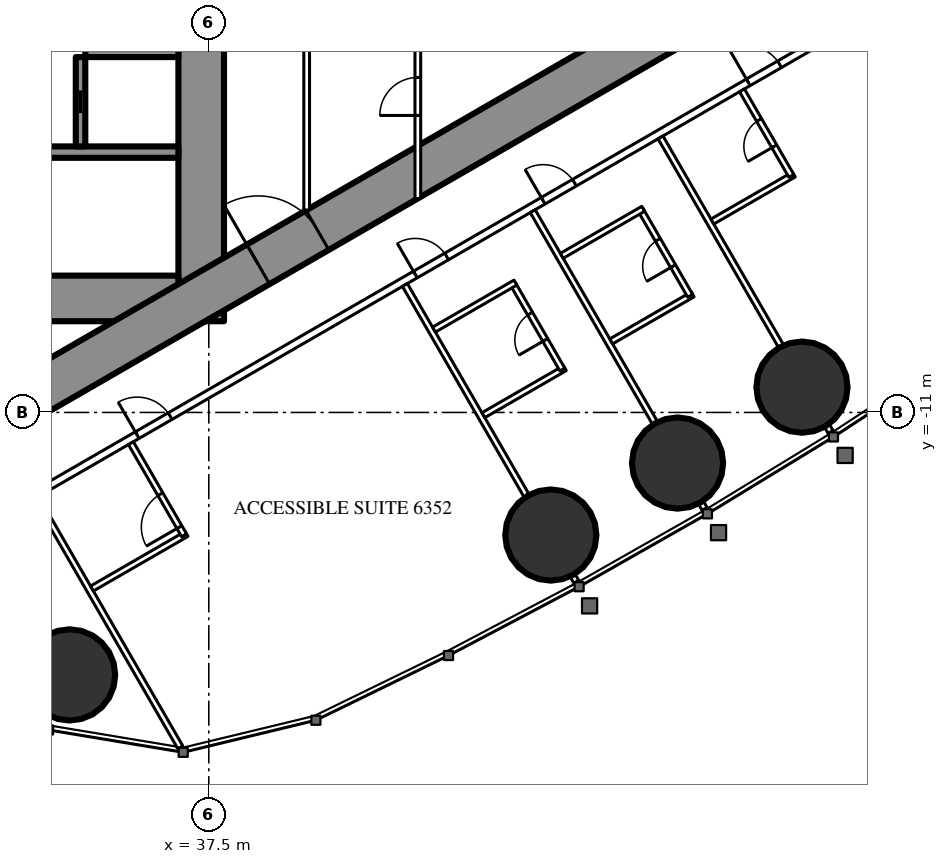
"""IFC4 building model, lengths in metres.
Left out: names, types, materials, properties, quantities, classifications, styles, units other than length and angle.
Written with IfcOpenShell. Run it as: python <this file> out.ifc"""

import sys

from ifc_helpers import new_model, si_unit, direction, frame, frame_2d, origin, origin_2d, place, context, subcontext, project, spatial, rectangle, circle, extrude, element, fill, save


model = new_model("IFC4")
c1 = context("Model", 3, precision=1e-05, world=origin(), true_north=direction((0.0, 1.0)))
c2 = subcontext(c1, "Body", "Model", "MODEL_VIEW")
j1 = project(units=[si_unit("LENGTHUNIT", "METRE"), si_unit("PLANEANGLEUNIT", "RADIAN")], contexts=[c1])
p1 = place(None, origin())
s1 = spatial("IfcSite", under=j1, at=p1, CompositionType="ELEMENT")
p2 = place(p1, origin())
s2 = spatial("IfcBuilding", under=s1, at=p2, CompositionType="ELEMENT")
p3 = place(p2, frame((0.0, 0.0, 236.9)))
s3 = spatial("IfcBuildingStorey", under=s2, at=p3, CompositionType="ELEMENT", Elevation=236.9)
for number, where, z_axis, x_axis in (
    (1, (33.837, -17.906, 0.0), (0.0, 0.0, 1.0), (1.0, 0.0, 0.0)),
    (2, (46.499, -14.226, 0.0), (0.0, 0.0, 1.0), (1.0, 0.0, 0.0)),
    (3, (49.834, -12.332, 0.0), (0.0, 0.0, 1.0), (1.0, 0.0, 0.0)),
    (4, (53.108, -10.334, 0.0), (0.0, 0.0, 1.0), (1.0, 0.0, 0.0)),
):
    element("IfcColumn", number, at=place(p3, frame(where, z_axis=z_axis, x_axis=x_axis)), inside=s3, PredefinedType="COLUMN", context=c2, shape_type="SweptSolid", body=[
        extrude(circle(Radius=1.2, at=origin_2d()), origin(), (0.0, 0.0, 1.0), 3.6),
    ])
p4 = place(p3, frame((37.3, -8.6, 0.0), z_axis=(0.0, 0.0, 1.0), x_axis=(0.0, 1.0, 0.0)))
e5 = element("IfcWall", 5, at=p4, inside=s3, PredefinedType="SHEAR", context=c2, shape_type="SweptSolid", body=[
    extrude(rectangle(XDim=17.2, YDim=1.2, at=frame_2d((8.6, 0.0))), origin(), (0.0, 0.0, 1.0), 3.6),
])
p5 = place(p4, frame((7.7, 0.0, 0.0)))
e6 = element("IfcOpeningElement", 6, at=p5, cuts=e5, PredefinedType="OPENING", context=c2, shape_type="SweptSolid", body=[
    extrude(rectangle(XDim=1.8, YDim=2.2, at=frame_2d((0.9, 1.1))), frame((0.0, 0.61, 0.0), z_axis=(0.0, -1.0, 0.0), x_axis=(1.0, 0.0, 0.0)), (0.0, 0.0, 1.0), 1.22),
])
p6 = place(p3, frame((28.3, -8.0, 0.0), z_axis=(0.0, 0.0, 1.0), x_axis=(1.0, 0.0, 0.0)))
e7 = element("IfcWall", 7, at=p6, inside=s3, PredefinedType="SHEAR", context=c2, shape_type="SweptSolid", body=[
    extrude(rectangle(XDim=8.4, YDim=1.2, at=frame_2d((4.2, 0.0))), origin(), (0.0, 0.0, 1.0), 3.6),
])
p7 = place(p6, frame((0.25, 0.0, 0.0)))
e8 = element("IfcOpeningElement", 8, at=p7, cuts=e7, PredefinedType="OPENING", context=c2, shape_type="SweptSolid", body=[
    extrude(rectangle(XDim=1.0, YDim=2.2, at=frame_2d((0.5, 1.1))), frame((0.0, 0.61, 0.0), z_axis=(0.0, -1.0, 0.0), x_axis=(1.0, 0.0, 0.0)), (0.0, 0.0, 1.0), 1.22),
])
p8 = place(p3, frame((28.3, -4.15, 0.0), z_axis=(0.0, 0.0, 1.0), x_axis=(1.0, 0.0, 0.0)))
e9 = element("IfcWall", 9, at=p8, inside=s3, PredefinedType="SHEAR", context=c2, shape_type="SweptSolid", body=[
    extrude(rectangle(XDim=8.4, YDim=0.3, at=frame_2d((4.2, 0.0))), origin(), (0.0, 0.0, 1.0), 3.6),
])
p9 = place(p3, frame((34.125, -4.0, 0.0), z_axis=(0.0, 0.0, 1.0), x_axis=(0.0, 1.0, 0.0)))
e10 = element("IfcWall", 10, at=p9, inside=s3, PredefinedType="SHEAR", context=c2, shape_type="SweptSolid", body=[
    extrude(rectangle(XDim=2.35, YDim=0.25, at=frame_2d((1.175, 0.0))), origin(), (0.0, 0.0, 1.0), 3.6),
])
p10 = place(p9, frame((0.875, 0.0, 0.0)))
e11 = element("IfcOpeningElement", 11, at=p10, cuts=e10, PredefinedType="OPENING", context=c2, shape_type="SweptSolid", body=[
    extrude(rectangle(XDim=0.6, YDim=2.0, at=frame_2d((0.3, 1.0))), frame((0.0, 0.135, 0.0), z_axis=(0.0, -1.0, 0.0), x_axis=(1.0, 0.0, 0.0)), (0.0, 0.0, 1.0), 0.27),
])
p11 = place(p3, frame((34.25, -1.525, 0.0), z_axis=(0.0, 0.0, 1.0), x_axis=(1.0, 0.0, 0.0)))
e12 = element("IfcWall", 12, at=p11, inside=s3, PredefinedType="SHEAR", context=c2, shape_type="SweptSolid", body=[
    extrude(rectangle(XDim=2.45, YDim=0.25, at=frame_2d((1.225, 0.0))), origin(), (0.0, 0.0, 1.0), 3.6),
])
p12 = place(p3, frame((27.2, -13.8, 0.0), z_axis=(0.0, 0.0, 1.0), x_axis=(0.866027159892, 0.499996958321, 0.0)))
e13 = element("IfcWall", 13, at=p12, inside=s3, PredefinedType="SHEAR", context=c2, shape_type="SweptSolid", body=[
    extrude(rectangle(XDim=27.947, YDim=1.2, at=frame_2d((13.973, 0.0))), origin(), (0.0, 0.0, 1.0), 3.6),
])
p13 = place(p12, frame((4.6, 0.0, 0.0)))
e14 = element("IfcOpeningElement", 14, at=p13, cuts=e13, PredefinedType="OPENING", context=c2, shape_type="SweptSolid", body=[
    extrude(rectangle(XDim=1.0, YDim=2.2, at=frame_2d((0.5, 1.1))), frame((0.0, 0.61, 0.0), z_axis=(0.0, -1.0, 0.0), x_axis=(1.0, 0.0, 0.0)), (0.0, 0.0, 1.0), 1.22),
])
p14 = place(p12, frame((13.395, 0.0, 0.0)))
e15 = element("IfcOpeningElement", 15, at=p14, cuts=e13, PredefinedType="OPENING", context=c2, shape_type="SweptSolid", body=[
    extrude(rectangle(XDim=1.8, YDim=2.2, at=frame_2d((0.9, 1.1))), frame((0.0, 0.61, 0.0), z_axis=(0.0, -1.0, 0.0), x_axis=(1.0, 0.0, 0.0)), (0.0, 0.0, 1.0), 1.22),
])
p15 = place(p3, frame((28.959, -15.44, 0.0), z_axis=(0.0, 0.0, 1.0), x_axis=(0.866025227435, 0.500000305447, 0.0)))
e16 = element("IfcWall", 16, at=p15, inside=s3, PredefinedType="PARTITIONING", context=c2, shape_type="SweptSolid", body=[
    extrude(rectangle(XDim=30.88, YDim=0.2, at=frame_2d((15.44, 0.0))), origin(), (0.0, 0.0, 1.0), 3.35),
])
p16 = place(p15, frame((1.494, 0.0, 0.0)))
e17 = element("IfcOpeningElement", 17, at=p16, cuts=e16, PredefinedType="OPENING", context=c2, shape_type="SweptSolid", body=[
    extrude(rectangle(XDim=1.8, YDim=2.03, at=frame_2d((0.9, 1.015))), frame((0.0, 0.11, 0.0), z_axis=(0.0, -1.0, 0.0), x_axis=(1.0, 0.0, 0.0)), (0.0, 0.0, 1.0), 0.22),
])
p17 = place(p15, frame((7.687, 0.0, 0.0)))
e18 = element("IfcOpeningElement", 18, at=p17, cuts=e16, PredefinedType="OPENING", context=c2, shape_type="SweptSolid", body=[
    extrude(rectangle(XDim=1.0, YDim=2.2, at=frame_2d((0.5, 1.1))), frame((0.0, 0.11, 0.0), z_axis=(0.0, -1.0, 0.0), x_axis=(1.0, 0.0, 0.0)), (0.0, 0.0, 1.0), 0.22),
])
p18 = place(p15, frame((16.137, 0.0, 0.0)))
e19 = element("IfcOpeningElement", 19, at=p18, cuts=e16, PredefinedType="OPENING", context=c2, shape_type="SweptSolid", body=[
    extrude(rectangle(XDim=0.95, YDim=2.2, at=frame_2d((0.475, 1.1))), frame((0.0, 0.11, 0.0), z_axis=(0.0, -1.0, 0.0), x_axis=(1.0, 0.0, 0.0)), (0.0, 0.0, 1.0), 0.22),
])
p19 = place(p15, frame((20.021, 0.0, 0.0)))
e20 = element("IfcOpeningElement", 20, at=p19, cuts=e16, PredefinedType="OPENING", context=c2, shape_type="SweptSolid", body=[
    extrude(rectangle(XDim=0.95, YDim=2.2, at=frame_2d((0.475, 1.1))), frame((0.0, 0.11, 0.0), z_axis=(0.0, -1.0, 0.0), x_axis=(1.0, 0.0, 0.0)), (0.0, 0.0, 1.0), 0.22),
])
p20 = place(p15, frame((26.253, 0.0, 0.0)))
e21 = element("IfcOpeningElement", 21, at=p20, cuts=e16, PredefinedType="OPENING", context=c2, shape_type="SweptSolid", body=[
    extrude(rectangle(XDim=0.95, YDim=2.2, at=frame_2d((0.475, 1.1))), frame((0.0, 0.11, 0.0), z_axis=(0.0, -1.0, 0.0), x_axis=(1.0, 0.0, 0.0)), (0.0, 0.0, 1.0), 0.22),
])
p21 = place(p3, frame((32.96, -13.246, 0.0), z_axis=(0.0, 0.0, 1.0), x_axis=(0.500000236886, -0.866025267018, 0.0)))
e22 = element("IfcWall", 22, at=p21, inside=s3, PredefinedType="PARTITIONING", context=c2, shape_type="SweptSolid", body=[
    extrude(rectangle(XDim=7.583, YDim=0.15, at=frame_2d((3.791, 0.0))), origin(), (0.0, 0.0, 1.0), 3.35),
])
p22 = place(p3, frame((42.66, -7.646, 0.0), z_axis=(0.0, 0.0, 1.0), x_axis=(0.499996592859, -0.866027370889, 0.0)))
e23 = element("IfcWall", 23, at=p22, inside=s3, PredefinedType="PARTITIONING", context=c2, shape_type="SweptSolid", body=[
    extrude(rectangle(XDim=6.398, YDim=0.15, at=frame_2d((3.199, 0.0))), origin(), (0.0, 0.0, 1.0), 2.45),
])
p23 = place(p3, frame((47.079, -15.3, 0.0), z_axis=(0.0, 0.0, 1.0), x_axis=(0.499212083968, -0.866479829667, 0.0)))
e24 = element("IfcWall", 24, at=p23, inside=s3, PredefinedType="PARTITIONING", context=c2, shape_type="SweptSolid", body=[
    extrude(rectangle(XDim=0.179, YDim=0.15, at=frame_2d((0.09, 0.0))), origin(), (0.0, 0.0, 1.0), 2.45),
])
p24 = place(p3, frame((46.023, -5.704, 0.0), z_axis=(0.0, 0.0, 1.0), x_axis=(0.499984478165, -0.866034365135, 0.0)))
e25 = element("IfcWall", 25, at=p24, inside=s3, PredefinedType="PARTITIONING", context=c2, shape_type="SweptSolid", body=[
    extrude(rectangle(XDim=6.426, YDim=0.15, at=frame_2d((3.213, 0.0))), origin(), (0.0, 0.0, 1.0), 2.45),
])
p25 = place(p3, frame((50.456, -13.382, 0.0), z_axis=(0.0, 0.0, 1.0), x_axis=(0.500661834965, -0.865642955848, 0.0)))
e26 = element("IfcWall", 26, at=p25, inside=s3, PredefinedType="PARTITIONING", context=c2, shape_type="SweptSolid", body=[
    extrude(rectangle(XDim=0.18, YDim=0.15, at=frame_2d((0.09, 0.0))), origin(), (0.0, 0.0, 1.0), 2.45),
])
p26 = place(p3, frame((49.385, -3.763, 0.0), z_axis=(0.0, 0.0, 1.0), x_axis=(0.499999447814, -0.866025722589, 0.0)))
e27 = element("IfcWall", 27, at=p26, inside=s3, PredefinedType="PARTITIONING", context=c2, shape_type="SweptSolid", body=[
    extrude(rectangle(XDim=6.333, YDim=0.15, at=frame_2d((3.166, 0.0))), origin(), (0.0, 0.0, 1.0), 2.45),
])
p27 = place(p3, frame((53.771, -11.36, 0.0), z_axis=(0.0, 0.0, 1.0), x_axis=(0.499524978789, -0.866299483762, 0.0)))
e28 = element("IfcWall", 28, at=p27, inside=s3, PredefinedType="PARTITIONING", context=c2, shape_type="SweptSolid", body=[
    extrude(rectangle(XDim=0.178, YDim=0.15, at=frame_2d((0.089, 0.0))), origin(), (0.0, 0.0, 1.0), 2.45),
])
p28 = place(p3, frame((34.425, -15.633, 0.0), z_axis=(0.0, 0.0, 1.0), x_axis=(0.866018712932, 0.500011588718, 0.0)))
e29 = element("IfcWall", 29, at=p28, inside=s3, PredefinedType="PARTITIONING", context=c2, shape_type="SweptSolid", body=[
    extrude(rectangle(XDim=2.875, YDim=0.15, at=frame_2d((1.438, 0.0))), origin(), (0.0, 0.0, 1.0), 3.35),
])
p29 = place(p3, frame((35.45, -11.808, 0.0), z_axis=(0.0, 0.0, 1.0), x_axis=(0.49994636267, -0.866056369097, 0.0)))
e30 = element("IfcWall", 30, at=p29, inside=s3, PredefinedType="PARTITIONING", context=c2, shape_type="SweptSolid", body=[
    extrude(rectangle(XDim=2.8, YDim=0.15, at=frame_2d((1.4, 0.0))), origin(), (0.0, 0.0, 1.0), 3.35),
])
p30 = place(p29, frame((1.55, 0.0, 0.0)))
e31 = element("IfcOpeningElement", 31, at=p30, cuts=e30, PredefinedType="OPENING", context=c2, shape_type="SweptSolid", body=[
    extrude(rectangle(XDim=1.0, YDim=2.2, at=frame_2d((0.5, 1.1))), frame((0.0, 0.085, 0.0), z_axis=(0.0, -1.0, 0.0), x_axis=(1.0, 0.0, 0.0)), (0.0, 0.0, 1.0), 0.17),
])
p31 = place(p3, frame((44.725, -11.072, 0.0), z_axis=(0.0, 0.0, 1.0), x_axis=(0.866006523861, 0.500032699561, 0.0)))
e32 = element("IfcWall", 32, at=p31, inside=s3, PredefinedType="PARTITIONING", context=c2, shape_type="SweptSolid", body=[
    extrude(rectangle(XDim=2.475, YDim=0.15, at=frame_2d((1.237, 0.0))), origin(), (0.0, 0.0, 1.0), 3.35),
])
p32 = place(p3, frame((45.503, -7.621, 0.0), z_axis=(0.0, 0.0, 1.0), x_axis=(0.500006934395, -0.866021400173, 0.0)))
e33 = element("IfcWall", 33, at=p32, inside=s3, PredefinedType="PARTITIONING", context=c2, shape_type="SweptSolid", body=[
    extrude(rectangle(XDim=2.6, YDim=0.15, at=frame_2d((1.3, 0.0))), origin(), (0.0, 0.0, 1.0), 3.35),
])
p33 = place(p32, frame((0.9, 0.0, 0.0)))
e34 = element("IfcOpeningElement", 34, at=p33, cuts=e33, PredefinedType="OPENING", context=c2, shape_type="SweptSolid", body=[
    extrude(rectangle(XDim=0.8, YDim=2.2, at=frame_2d((0.4, 1.1))), frame((0.0, 0.085, 0.0), z_axis=(0.0, -1.0, 0.0), x_axis=(1.0, 0.0, 0.0)), (0.0, 0.0, 1.0), 0.17),
])
for number, where, z_axis, x_axis in (
    (35, (43.425, -8.821, 0.0), (0.0, 0.0, 1.0), (0.866, 0.5, 0.0)),
    (36, (48.088, -9.13, 0.0), (0.0, 0.0, 1.0), (0.866, 0.5, 0.0)),
):
    element("IfcWall", number, at=place(p3, frame(where, z_axis=z_axis, x_axis=x_axis)), inside=s3, PredefinedType="PARTITIONING", context=c2, shape_type="SweptSolid", body=[
        extrude(rectangle(XDim=2.475, YDim=0.15, at=frame_2d((1.237, 0.0))), origin(), (0.0, 0.0, 1.0), 3.35),
    ])
p34 = place(p3, frame((48.866, -5.679, 0.0), z_axis=(0.0, 0.0, 1.0), x_axis=(0.500006934395, -0.866021400173, 0.0)))
e37 = element("IfcWall", 37, at=p34, inside=s3, PredefinedType="PARTITIONING", context=c2, shape_type="SweptSolid", body=[
    extrude(rectangle(XDim=2.6, YDim=0.15, at=frame_2d((1.3, 0.0))), origin(), (0.0, 0.0, 1.0), 3.35),
])
p35 = place(p34, frame((0.9, 0.0, 0.0)))
e38 = element("IfcOpeningElement", 38, at=p35, cuts=e37, PredefinedType="OPENING", context=c2, shape_type="SweptSolid", body=[
    extrude(rectangle(XDim=0.8, YDim=2.2, at=frame_2d((0.4, 1.1))), frame((0.0, 0.085, 0.0), z_axis=(0.0, -1.0, 0.0), x_axis=(1.0, 0.0, 0.0)), (0.0, 0.0, 1.0), 0.17),
])
p36 = place(p3, frame((46.788, -6.879, 0.0), z_axis=(0.0, 0.0, 1.0), x_axis=(0.866006523861, 0.500032699561, 0.0)))
e39 = element("IfcWall", 39, at=p36, inside=s3, PredefinedType="PARTITIONING", context=c2, shape_type="SweptSolid", body=[
    extrude(rectangle(XDim=2.475, YDim=0.15, at=frame_2d((1.237, 0.0))), origin(), (0.0, 0.0, 1.0), 3.35),
])
p37 = place(p3, frame((50.75, -5.977, 0.0), z_axis=(0.0, 0.0, 1.0), x_axis=(0.866031185235, 0.4999899861, 0.0)))
e40 = element("IfcWall", 40, at=p37, inside=s3, PredefinedType="PARTITIONING", context=c2, shape_type="SweptSolid", body=[
    extrude(rectangle(XDim=2.475, YDim=0.15, at=frame_2d((1.238, 0.0))), origin(), (0.0, 0.0, 1.0), 3.35),
])
p38 = place(p3, frame((51.529, -2.525, 0.0), z_axis=(0.0, 0.0, 1.0), x_axis=(0.500006934395, -0.866021400173, 0.0)))
e41 = element("IfcWall", 41, at=p38, inside=s3, PredefinedType="PARTITIONING", context=c2, shape_type="SweptSolid", body=[
    extrude(rectangle(XDim=2.6, YDim=0.15, at=frame_2d((1.3, 0.0))), origin(), (0.0, 0.0, 1.0), 3.35),
])
p39 = place(p38, frame((0.9, 0.0, 0.0)))
e42 = element("IfcOpeningElement", 42, at=p39, cuts=e41, PredefinedType="OPENING", context=c2, shape_type="SweptSolid", body=[
    extrude(rectangle(XDim=0.8, YDim=2.2, at=frame_2d((0.4, 1.1))), frame((0.0, 0.085, 0.0), z_axis=(0.0, -1.0, 0.0), x_axis=(1.0, 0.0, 0.0)), (0.0, 0.0, 1.0), 0.17),
])
p40 = place(p3, frame((40.075, -5.674, 0.0), z_axis=(0.0, 0.0, 1.0), x_axis=(0.0, 1.0, 0.0)))
e43 = element("IfcWall", 43, at=p40, inside=s3, PredefinedType="PARTITIONING", context=c2, shape_type="SweptSolid", body=[
    extrude(rectangle(XDim=11.348, YDim=0.15, at=frame_2d((5.674, 0.0))), origin(), (0.0, 0.0, 1.0), 3.35),
])
p41 = place(p40, frame((4.774, 0.0, 0.0)))
e44 = element("IfcOpeningElement", 44, at=p41, cuts=e43, PredefinedType="OPENING", context=c2, shape_type="SweptSolid", body=[
    extrude(rectangle(XDim=1.8, YDim=2.2, at=frame_2d((0.9, 1.1))), frame((0.0, 0.085, 0.0), z_axis=(0.0, -1.0, 0.0), x_axis=(1.0, 0.0, 0.0)), (0.0, 0.0, 1.0), 0.17),
])
p42 = place(p3, frame((43.0, -5.371, 0.0), z_axis=(0.0, 0.0, 1.0), x_axis=(0.0, 1.0, 0.0)))
e45 = element("IfcWall", 45, at=p42, inside=s3, PredefinedType="PARTITIONING", context=c2, shape_type="SweptSolid", body=[
    extrude(rectangle(XDim=10.741, YDim=0.15, at=frame_2d((5.371, 0.0))), origin(), (0.0, 0.0, 1.0), 3.35),
])
p43 = place(p42, frame((2.185, 0.0, 0.0)))
e46 = element("IfcOpeningElement", 46, at=p43, cuts=e45, PredefinedType="OPENING", context=c2, shape_type="SweptSolid", body=[
    extrude(rectangle(XDim=1.0, YDim=2.2, at=frame_2d((0.5, 1.1))), frame((0.0, 0.085, 0.0), z_axis=(0.0, -1.0, 0.0), x_axis=(1.0, 0.0, 0.0)), (0.0, 0.0, 1.0), 0.17),
])
p44 = place(p42, frame((7.556, 0.0, 0.0)))
e47 = element("IfcOpeningElement", 47, at=p44, cuts=e45, PredefinedType="OPENING", context=c2, shape_type="SweptSolid", body=[
    extrude(rectangle(XDim=1.0, YDim=2.2, at=frame_2d((0.5, 1.1))), frame((0.0, 0.085, 0.0), z_axis=(0.0, -1.0, 0.0), x_axis=(1.0, 0.0, 0.0)), (0.0, 0.0, 1.0), 0.17),
])
p45 = place(p30, origin())
e48 = element("IfcDoor", 48, at=p45, inside=s3, OperationType="SINGLE_SWING_RIGHT", PredefinedType="DOOR", context=c2, shape_type="SweptSolid", body=[
    extrude(rectangle(XDim=1.0, YDim=2.2, at=frame_2d((0.5, 1.1))), frame((0.0, 0.025, 0.0), z_axis=(0.0, -1.0, 0.0), x_axis=(1.0, 0.0, 0.0)), (0.0, 0.0, 1.0), 0.05),
])
fill(e31, e48)
p46 = place(p17, origin())
e49 = element("IfcDoor", 49, at=p46, inside=s3, OperationType="SINGLE_SWING_LEFT", PredefinedType="DOOR", context=c2, shape_type="SweptSolid", body=[
    extrude(rectangle(XDim=1.0, YDim=2.2, at=frame_2d((0.5, 1.1))), frame((0.0, 0.025, 0.0), z_axis=(0.0, -1.0, 0.0), x_axis=(1.0, 0.0, 0.0)), (0.0, 0.0, 1.0), 0.05),
])
fill(e18, e49)
p47 = place(p33, origin())
e50 = element("IfcDoor", 50, at=p47, inside=s3, OperationType="SINGLE_SWING_RIGHT", PredefinedType="DOOR", context=c2, shape_type="SweptSolid", body=[
    extrude(rectangle(XDim=0.8, YDim=2.2, at=frame_2d((0.4, 1.1))), frame((0.0, 0.025, 0.0), z_axis=(0.0, -1.0, 0.0), x_axis=(1.0, 0.0, 0.0)), (0.0, 0.0, 1.0), 0.05),
])
fill(e34, e50)
p48 = place(p18, origin())
e51 = element("IfcDoor", 51, at=p48, inside=s3, OperationType="SINGLE_SWING_LEFT", PredefinedType="DOOR", context=c2, shape_type="SweptSolid", body=[
    extrude(rectangle(XDim=0.95, YDim=2.2, at=frame_2d((0.475, 1.1))), frame((0.0, 0.025, 0.0), z_axis=(0.0, -1.0, 0.0), x_axis=(1.0, 0.0, 0.0)), (0.0, 0.0, 1.0), 0.05),
])
fill(e19, e51)
p49 = place(p35, origin())
e52 = element("IfcDoor", 52, at=p49, inside=s3, OperationType="SINGLE_SWING_RIGHT", PredefinedType="DOOR", context=c2, shape_type="SweptSolid", body=[
    extrude(rectangle(XDim=0.8, YDim=2.2, at=frame_2d((0.4, 1.1))), frame((0.0, 0.025, 0.0), z_axis=(0.0, -1.0, 0.0), x_axis=(1.0, 0.0, 0.0)), (0.0, 0.0, 1.0), 0.05),
])
fill(e38, e52)
p50 = place(p19, origin())
e53 = element("IfcDoor", 53, at=p50, inside=s3, OperationType="SINGLE_SWING_LEFT", PredefinedType="DOOR", context=c2, shape_type="SweptSolid", body=[
    extrude(rectangle(XDim=0.95, YDim=2.2, at=frame_2d((0.475, 1.1))), frame((0.0, 0.025, 0.0), z_axis=(0.0, -1.0, 0.0), x_axis=(1.0, 0.0, 0.0)), (0.0, 0.0, 1.0), 0.05),
])
fill(e20, e53)
p51 = place(p39, origin())
e54 = element("IfcDoor", 54, at=p51, inside=s3, OperationType="SINGLE_SWING_RIGHT", PredefinedType="DOOR", context=c2, shape_type="SweptSolid", body=[
    extrude(rectangle(XDim=0.8, YDim=2.2, at=frame_2d((0.4, 1.1))), frame((0.0, 0.025, 0.0), z_axis=(0.0, -1.0, 0.0), x_axis=(1.0, 0.0, 0.0)), (0.0, 0.0, 1.0), 0.05),
])
fill(e42, e54)
p52 = place(p20, origin())
e55 = element("IfcDoor", 55, at=p52, inside=s3, OperationType="SINGLE_SWING_LEFT", PredefinedType="DOOR", context=c2, shape_type="SweptSolid", body=[
    extrude(rectangle(XDim=0.95, YDim=2.2, at=frame_2d((0.475, 1.1))), frame((0.0, 0.025, 0.0), z_axis=(0.0, -1.0, 0.0), x_axis=(1.0, 0.0, 0.0)), (0.0, 0.0, 1.0), 0.05),
])
fill(e21, e55)
p53 = place(p43, origin())
e56 = element("IfcDoor", 56, at=p53, inside=s3, OperationType="SINGLE_SWING_LEFT", PredefinedType="DOOR", context=c2, shape_type="SweptSolid", body=[
    extrude(rectangle(XDim=1.0, YDim=2.2, at=frame_2d((0.5, 1.1))), frame((0.0, 0.025, 0.0), z_axis=(0.0, -1.0, 0.0), x_axis=(1.0, 0.0, 0.0)), (0.0, 0.0, 1.0), 0.05),
])
fill(e46, e56)
p54 = place(p14, origin())
e57 = element("IfcDoor", 57, at=p54, inside=s3, OperationType="DOUBLE_DOOR_SINGLE_SWING", PredefinedType="DOOR", context=c2, shape_type="SweptSolid", body=[
    extrude(rectangle(XDim=1.8, YDim=2.2, at=frame_2d((0.9, 1.1))), frame((0.0, 0.025, 0.0), z_axis=(0.0, -1.0, 0.0), x_axis=(1.0, 0.0, 0.0)), (0.0, 0.0, 1.0), 0.05),
])
fill(e15, e57)
p55 = place(p10, origin())
e58 = element("IfcDoor", 58, at=p55, inside=s3, OperationType="SLIDING_TO_LEFT", PredefinedType="DOOR", context=c2, shape_type="SweptSolid", body=[
    extrude(rectangle(XDim=0.6, YDim=2.0, at=frame_2d((0.3, 1.0))), frame((0.0, 0.025, 0.0), z_axis=(0.0, -1.0, 0.0), x_axis=(1.0, 0.0, 0.0)), (0.0, 0.0, 1.0), 0.05),
])
fill(e11, e58)
save(model, sys.argv[1])
